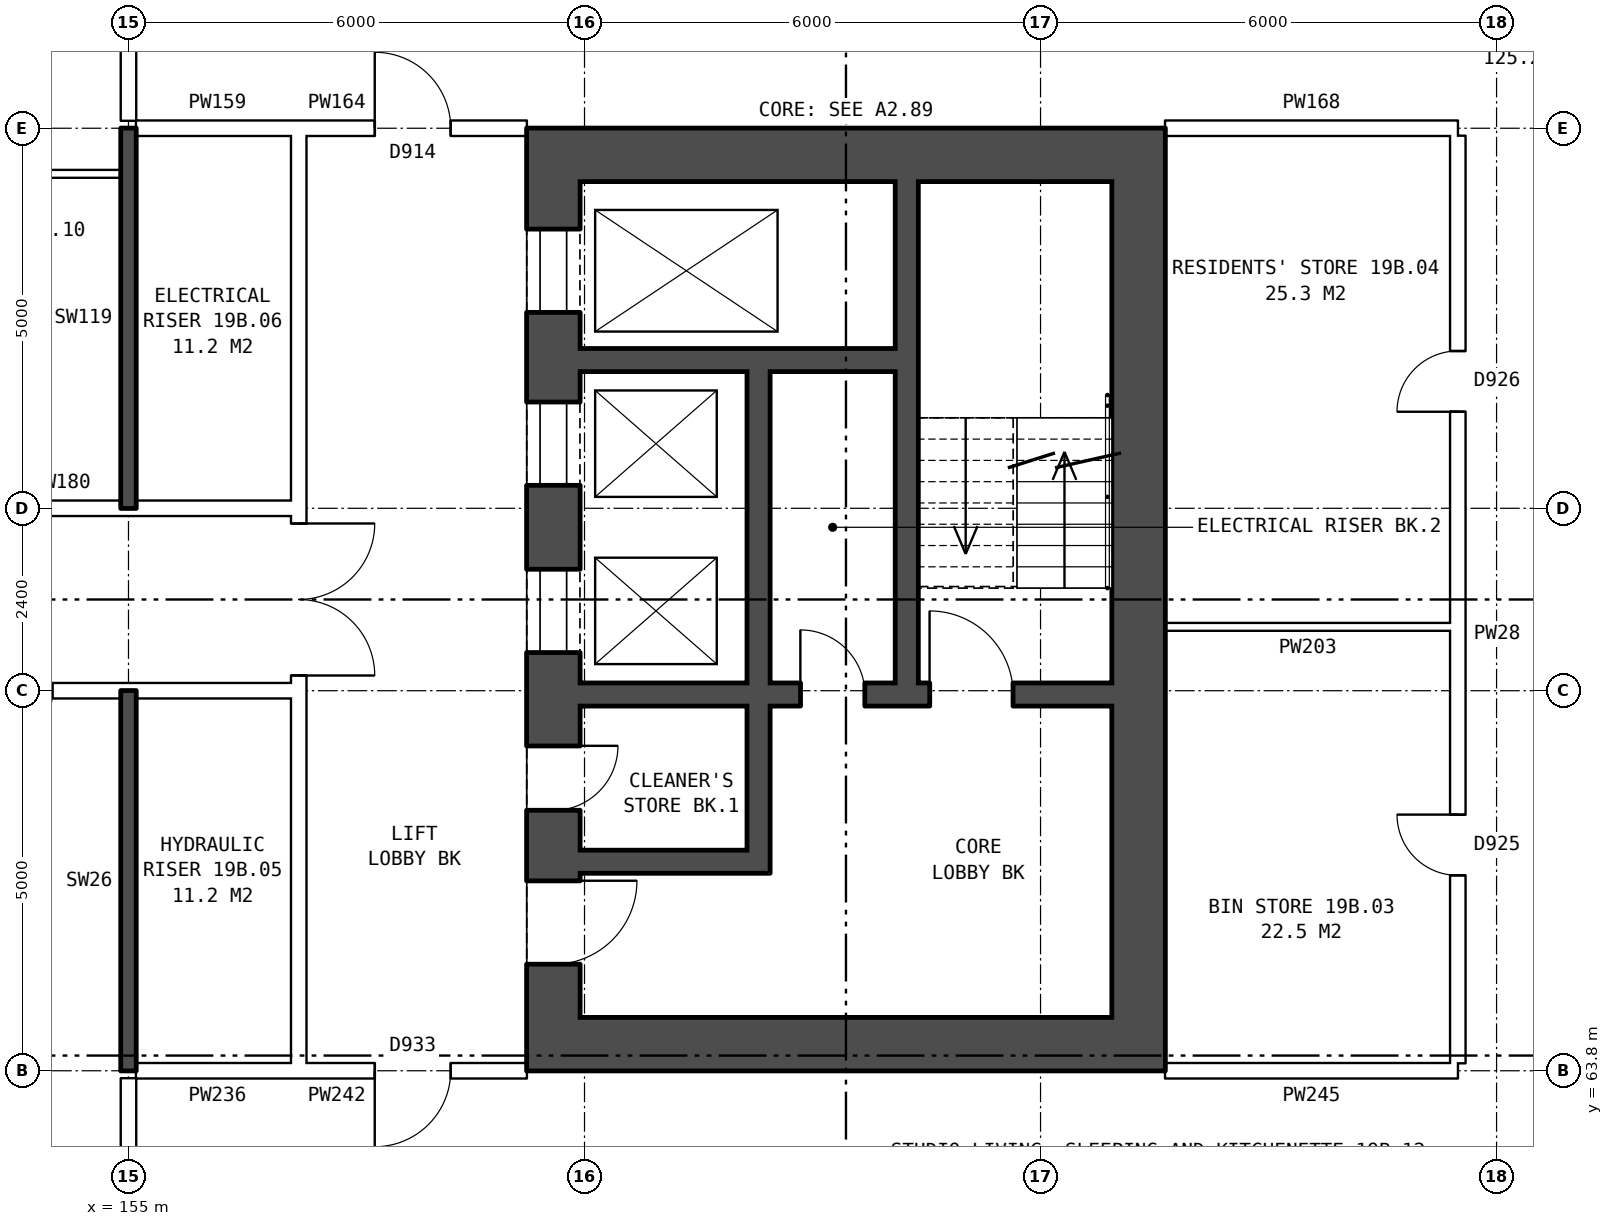
"""IFC4 building model, lengths in metres.
Left out: names, types, materials, properties, quantities, classifications, styles, units other than length and angle.
Written with IfcOpenShell. Run it as: python <this file> out.ifc"""

import sys

from ifc_helpers import new_model, si_unit, direction, frame, frame_2d, origin, place, context, subcontext, project, spatial, rectangle, extrude, element, fill, save


model = new_model("IFC4")
c1 = context("Model", 3, precision=1e-05, world=origin(), true_north=direction((0.0, 1.0)))
c2 = subcontext(c1, "Body", "Model", "MODEL_VIEW")
j1 = project(units=[si_unit("LENGTHUNIT", "METRE"), si_unit("PLANEANGLEUNIT", "RADIAN")], contexts=[c1])
p1 = place(None, origin())
s1 = spatial("IfcSite", under=j1, at=p1, CompositionType="ELEMENT")
p2 = place(p1, origin())
s2 = spatial("IfcBuilding", under=s1, at=p2, CompositionType="ELEMENT")
p3 = place(p2, frame((0.0, 0.0, 71.6)))
s3 = spatial("IfcBuildingStorey", under=s2, at=p3, CompositionType="ELEMENT", Elevation=71.6)
p4 = place(p3, frame((160.59, 75.5, 0.0), z_axis=(0.0, 0.0, 1.0), x_axis=(0.0, -1.0, 0.0)))
e1 = element("IfcWall", 1, at=p4, inside=s3, PredefinedType="SHEAR", context=c2, shape_type="SweptSolid", body=[
    extrude(rectangle(XDim=11.0, YDim=0.7, at=frame_2d((5.5, 0.0))), origin(), (0.0, 0.0, 1.0), 2.85),
])
p5 = place(p4, frame((0.625, 0.0, 0.0)))
e2 = element("IfcOpeningElement", 2, at=p5, cuts=e1, PredefinedType="OPENING", context=c2, shape_type="SweptSolid", body=[
    extrude(rectangle(XDim=1.1, YDim=2.1, at=frame_2d((0.55, 1.05))), frame((0.0, 0.36, 0.0), z_axis=(0.0, -1.0, 0.0), x_axis=(1.0, 0.0, 0.0)), (0.0, 0.0, 1.0), 0.72),
])
p6 = place(p4, frame((2.9, 0.0, 0.0)))
e3 = element("IfcOpeningElement", 3, at=p6, cuts=e1, PredefinedType="OPENING", context=c2, shape_type="SweptSolid", body=[
    extrude(rectangle(XDim=1.1, YDim=2.1, at=frame_2d((0.55, 1.05))), frame((0.0, 0.36, 0.0), z_axis=(0.0, -1.0, 0.0), x_axis=(1.0, 0.0, 0.0)), (0.0, 0.0, 1.0), 0.72),
])
p7 = place(p4, frame((5.1, 0.0, 0.0)))
e4 = element("IfcOpeningElement", 4, at=p7, cuts=e1, PredefinedType="OPENING", context=c2, shape_type="SweptSolid", body=[
    extrude(rectangle(XDim=1.1, YDim=2.1, at=frame_2d((0.55, 1.05))), frame((0.0, 0.36, 0.0), z_axis=(0.0, -1.0, 0.0), x_axis=(1.0, 0.0, 0.0)), (0.0, 0.0, 1.0), 0.72),
])
p8 = place(p4, frame((9.2, 0.0, 0.0)))
e5 = element("IfcOpeningElement", 5, at=p8, cuts=e1, PredefinedType="OPENING", context=c2, shape_type="SweptSolid", body=[
    extrude(rectangle(XDim=1.1, YDim=2.1, at=frame_2d((0.55, 1.05))), frame((0.0, 0.36, 0.0), z_axis=(0.0, -1.0, 0.0), x_axis=(1.0, 0.0, 0.0)), (0.0, 0.0, 1.0), 0.72),
])
p9 = place(p4, frame((7.425, 0.0, 0.0)))
e6 = element("IfcOpeningElement", 6, at=p9, cuts=e1, PredefinedType="OPENING", context=c2, shape_type="SweptSolid", body=[
    extrude(rectangle(XDim=0.85, YDim=2.1, at=frame_2d((0.425, 1.05))), frame((0.0, 0.36, 0.0), z_axis=(0.0, -1.0, 0.0), x_axis=(1.0, 0.0, 0.0)), (0.0, 0.0, 1.0), 0.72),
])
p10 = place(p3, frame((168.29, 75.5, 0.0), z_axis=(0.0, 0.0, 1.0), x_axis=(0.0, -1.0, 0.0)))
e7 = element("IfcWall", 7, at=p10, inside=s3, PredefinedType="SHEAR", context=c2, shape_type="SweptSolid", body=[
    extrude(rectangle(XDim=11.0, YDim=0.7, at=frame_2d((5.5, 0.0))), origin(), (0.0, 0.0, 1.0), 2.85),
])
for number, where, z_axis, x_axis in (
    (8, (160.24, 75.85, 0.0), (0.0, 0.0, 1.0), (1.0, 0.0, 0.0)),
    (9, (160.24, 64.15, 0.0), (0.0, 0.0, 1.0), (1.0, 0.0, 0.0)),
):
    element("IfcWall", number, at=place(p3, frame(where, z_axis=z_axis, x_axis=x_axis)), inside=s3, PredefinedType="SHEAR", context=c2, shape_type="SweptSolid", body=[
        extrude(rectangle(XDim=8.4, YDim=0.7, at=frame_2d((4.2, 0.0))), origin(), (0.0, 0.0, 1.0), 2.85),
    ])
p11 = place(p3, frame((160.94, 73.15, 0.0), z_axis=(0.0, 0.0, 1.0), x_axis=(1.0, 0.0, 0.0)))
e10 = element("IfcWall", 10, at=p11, inside=s3, PredefinedType="SHEAR", context=c2, shape_type="SweptSolid", body=[
    extrude(rectangle(XDim=4.15, YDim=0.3, at=frame_2d((2.075, 0.0))), origin(), (0.0, 0.0, 1.0), 2.85),
])
p12 = place(p3, frame((160.94, 68.75, 0.0), z_axis=(0.0, 0.0, 1.0), x_axis=(1.0, 0.0, 0.0)))
e11 = element("IfcWall", 11, at=p12, inside=s3, PredefinedType="SHEAR", context=c2, shape_type="SweptSolid", body=[
    extrude(rectangle(XDim=7.0, YDim=0.3, at=frame_2d((3.5, 0.0))), origin(), (0.0, 0.0, 1.0), 2.85),
])
p13 = place(p12, frame((4.6, 0.0, 0.0)))
e12 = element("IfcOpeningElement", 12, at=p13, cuts=e11, PredefinedType="OPENING", context=c2, shape_type="SweptSolid", body=[
    extrude(rectangle(XDim=1.1, YDim=2.1, at=frame_2d((0.55, 1.05))), frame((0.0, 0.16, 0.0), z_axis=(0.0, -1.0, 0.0), x_axis=(1.0, 0.0, 0.0)), (0.0, 0.0, 1.0), 0.32),
])
p14 = place(p12, frame((2.9, 0.0, 0.0)))
e13 = element("IfcOpeningElement", 13, at=p14, cuts=e11, PredefinedType="OPENING", context=c2, shape_type="SweptSolid", body=[
    extrude(rectangle(XDim=0.85, YDim=2.1, at=frame_2d((0.425, 1.05))), frame((0.0, 0.16, 0.0), z_axis=(0.0, -1.0, 0.0), x_axis=(1.0, 0.0, 0.0)), (0.0, 0.0, 1.0), 0.32),
])
p15 = place(p3, frame((160.94, 66.55, 0.0), z_axis=(0.0, 0.0, 1.0), x_axis=(1.0, 0.0, 0.0)))
e14 = element("IfcWall", 14, at=p15, inside=s3, PredefinedType="SHEAR", context=c2, shape_type="SweptSolid", body=[
    extrude(rectangle(XDim=2.2, YDim=0.3, at=frame_2d((1.1, 0.0))), origin(), (0.0, 0.0, 1.0), 2.85),
])
p16 = place(p3, frame((163.29, 73.0, 0.0), z_axis=(0.0, 0.0, 1.0), x_axis=(0.0, -1.0, 0.0)))
e15 = element("IfcWall", 15, at=p16, inside=s3, PredefinedType="SHEAR", context=c2, shape_type="SweptSolid", body=[
    extrude(rectangle(XDim=4.1, YDim=0.3, at=frame_2d((2.05, 0.0))), origin(), (0.0, 0.0, 1.0), 2.85),
])
p17 = place(p3, frame((163.29, 68.6, 0.0), z_axis=(0.0, 0.0, 1.0), x_axis=(0.0, -1.0, 0.0)))
e16 = element("IfcWall", 16, at=p17, inside=s3, PredefinedType="SHEAR", context=c2, shape_type="SweptSolid", body=[
    extrude(rectangle(XDim=2.2, YDim=0.3, at=frame_2d((1.1, 0.0))), origin(), (0.0, 0.0, 1.0), 2.85),
])
p18 = place(p3, frame((165.24, 75.5, 0.0), z_axis=(0.0, 0.0, 1.0), x_axis=(0.0, -1.0, 0.0)))
e17 = element("IfcWall", 17, at=p18, inside=s3, PredefinedType="SHEAR", context=c2, shape_type="SweptSolid", body=[
    extrude(rectangle(XDim=6.6, YDim=0.3, at=frame_2d((3.3, 0.0))), origin(), (0.0, 0.0, 1.0), 2.85),
])
p19 = place(p3, frame((157.24, 63.9, 0.0), z_axis=(0.0, 0.0, 1.0), x_axis=(0.0, 1.0, 0.0)))
e18 = element("IfcWall", 18, at=p19, inside=s3, PredefinedType="PARTITIONING", context=c2, shape_type="SweptSolid", body=[
    extrude(rectangle(XDim=12.2, YDim=0.2, at=frame_2d((6.1, 0.0))), origin(), (0.0, 0.0, 1.0), 2.85),
])
p20 = place(p19, frame((5.1, 0.0, 0.0)))
e19 = element("IfcOpeningElement", 19, at=p20, cuts=e18, PredefinedType="OPENING", context=c2, shape_type="SweptSolid", body=[
    extrude(rectangle(XDim=2.0, YDim=2.1, at=frame_2d((1.0, 1.05))), frame((0.0, 0.11, 0.0), z_axis=(0.0, -1.0, 0.0), x_axis=(1.0, 0.0, 0.0)), (0.0, 0.0, 1.0), 0.22),
])
p21 = place(p3, frame((155.1, 63.8, 0.0), z_axis=(0.0, 0.0, 1.0), x_axis=(1.0, 0.0, 0.0)))
e20 = element("IfcWall", 20, at=p21, inside=s3, PredefinedType="PARTITIONING", context=c2, shape_type="SweptSolid", body=[
    extrude(rectangle(XDim=2.14, YDim=0.2, at=frame_2d((1.07, 0.0))), origin(), (0.0, 0.0, 1.0), 2.85),
])
p22 = place(p3, frame((157.24, 63.8, 0.0), z_axis=(0.0, 0.0, 1.0), x_axis=(1.0, 0.0, 0.0)))
e21 = element("IfcWall", 21, at=p22, inside=s3, PredefinedType="PARTITIONING", context=c2, shape_type="SweptSolid", body=[
    extrude(rectangle(XDim=3.0, YDim=0.2, at=frame_2d((1.5, 0.0))), origin(), (0.0, 0.0, 1.0), 2.85),
])
p23 = place(p22, frame((1.0, 0.0, 0.0)))
e22 = element("IfcOpeningElement", 22, at=p23, cuts=e21, PredefinedType="OPENING", context=c2, shape_type="SweptSolid", body=[
    extrude(rectangle(XDim=1.0, YDim=2.1, at=frame_2d((0.5, 1.05))), frame((0.0, 0.11, 0.0), z_axis=(0.0, -1.0, 0.0), x_axis=(1.0, 0.0, 0.0)), (0.0, 0.0, 1.0), 0.22),
])
p24 = place(p3, frame((168.64, 63.8, 0.0), z_axis=(0.0, 0.0, 1.0), x_axis=(1.0, 0.0, 0.0)))
e23 = element("IfcWall", 23, at=p24, inside=s3, PredefinedType="PARTITIONING", context=c2, shape_type="SweptSolid", body=[
    extrude(rectangle(XDim=3.85, YDim=0.2, at=frame_2d((1.925, 0.0))), origin(), (0.0, 0.0, 1.0), 2.85),
])
p25 = place(p3, frame((142.76, 68.8, 0.0), z_axis=(0.0, 0.0, 1.0), x_axis=(1.0, 0.0, 0.0)))
e24 = element("IfcWall", 24, at=p25, inside=s3, PredefinedType="PARTITIONING", context=c2, shape_type="SweptSolid", body=[
    extrude(rectangle(XDim=14.48, YDim=0.2, at=frame_2d((7.24, 0.0))), origin(), (0.0, 0.0, 1.0), 2.85),
])
p26 = place(p25, frame((4.24, 0.0, 0.0)))
e25 = element("IfcOpeningElement", 25, at=p26, cuts=e24, PredefinedType="OPENING", context=c2, shape_type="SweptSolid", body=[
    extrude(rectangle(XDim=1.0, YDim=2.1, at=frame_2d((0.5, 1.05))), frame((0.0, 0.11, 0.0), z_axis=(0.0, -1.0, 0.0), x_axis=(1.0, 0.0, 0.0)), (0.0, 0.0, 1.0), 0.22),
])
p27 = place(p25, frame((10.24, 0.0, 0.0)))
e26 = element("IfcOpeningElement", 26, at=p27, cuts=e24, PredefinedType="OPENING", context=c2, shape_type="SweptSolid", body=[
    extrude(rectangle(XDim=1.0, YDim=2.1, at=frame_2d((0.5, 1.05))), frame((0.0, 0.11, 0.0), z_axis=(0.0, -1.0, 0.0), x_axis=(1.0, 0.0, 0.0)), (0.0, 0.0, 1.0), 0.22),
])
p28 = place(p3, frame((168.64, 69.64, 0.0), z_axis=(0.0, 0.0, 1.0), x_axis=(1.0, 0.0, 0.0)))
e27 = element("IfcWall", 27, at=p28, inside=s3, PredefinedType="PARTITIONING", context=c2, shape_type="SweptSolid", body=[
    extrude(rectangle(XDim=3.75, YDim=0.1, at=frame_2d((1.875, 0.0))), origin(), (0.0, 0.0, 1.0), 2.85),
])
p29 = place(p3, frame((142.76, 71.2, 0.0), z_axis=(0.0, 0.0, 1.0), x_axis=(1.0, 0.0, 0.0)))
e28 = element("IfcWall", 28, at=p29, inside=s3, PredefinedType="PARTITIONING", context=c2, shape_type="SweptSolid", body=[
    extrude(rectangle(XDim=14.48, YDim=0.2, at=frame_2d((7.24, 0.0))), origin(), (0.0, 0.0, 1.0), 2.85),
])
p30 = place(p29, frame((4.24, 0.0, 0.0)))
e29 = element("IfcOpeningElement", 29, at=p30, cuts=e28, PredefinedType="OPENING", context=c2, shape_type="SweptSolid", body=[
    extrude(rectangle(XDim=1.0, YDim=2.1, at=frame_2d((0.5, 1.05))), frame((0.0, 0.11, 0.0), z_axis=(0.0, -1.0, 0.0), x_axis=(1.0, 0.0, 0.0)), (0.0, 0.0, 1.0), 0.22),
])
p31 = place(p29, frame((7.24, 0.0, 0.0)))
e30 = element("IfcOpeningElement", 30, at=p31, cuts=e28, PredefinedType="OPENING", context=c2, shape_type="SweptSolid", body=[
    extrude(rectangle(XDim=1.0, YDim=2.1, at=frame_2d((0.5, 1.05))), frame((0.0, 0.11, 0.0), z_axis=(0.0, -1.0, 0.0), x_axis=(1.0, 0.0, 0.0)), (0.0, 0.0, 1.0), 0.22),
])
p32 = place(p3, frame((152.0, 75.6, 0.0), z_axis=(0.0, 0.0, 1.0), x_axis=(1.0, 0.0, 0.0)))
e31 = element("IfcWall", 31, at=p32, inside=s3, PredefinedType="PARTITIONING", context=c2, shape_type="SweptSolid", body=[
    extrude(rectangle(XDim=2.9, YDim=0.1, at=frame_2d((1.45, 0.0))), origin(), (0.0, 0.0, 1.0), 2.85),
])
p33 = place(p3, frame((155.1, 76.2, 0.0), z_axis=(0.0, 0.0, 1.0), x_axis=(1.0, 0.0, 0.0)))
e32 = element("IfcWall", 32, at=p33, inside=s3, PredefinedType="PARTITIONING", context=c2, shape_type="SweptSolid", body=[
    extrude(rectangle(XDim=2.14, YDim=0.2, at=frame_2d((1.07, 0.0))), origin(), (0.0, 0.0, 1.0), 2.85),
])
p34 = place(p3, frame((157.24, 76.2, 0.0), z_axis=(0.0, 0.0, 1.0), x_axis=(1.0, 0.0, 0.0)))
e33 = element("IfcWall", 33, at=p34, inside=s3, PredefinedType="PARTITIONING", context=c2, shape_type="SweptSolid", body=[
    extrude(rectangle(XDim=3.0, YDim=0.2, at=frame_2d((1.5, 0.0))), origin(), (0.0, 0.0, 1.0), 2.85),
])
p35 = place(p34, frame((1.0, 0.0, 0.0)))
e34 = element("IfcOpeningElement", 34, at=p35, cuts=e33, PredefinedType="OPENING", context=c2, shape_type="SweptSolid", body=[
    extrude(rectangle(XDim=1.0, YDim=2.1, at=frame_2d((0.5, 1.05))), frame((0.0, 0.11, 0.0), z_axis=(0.0, -1.0, 0.0), x_axis=(1.0, 0.0, 0.0)), (0.0, 0.0, 1.0), 0.22),
])
p36 = place(p3, frame((168.64, 76.2, 0.0), z_axis=(0.0, 0.0, 1.0), x_axis=(1.0, 0.0, 0.0)))
e35 = element("IfcWall", 35, at=p36, inside=s3, PredefinedType="PARTITIONING", context=c2, shape_type="SweptSolid", body=[
    extrude(rectangle(XDim=3.85, YDim=0.2, at=frame_2d((1.925, 0.0))), origin(), (0.0, 0.0, 1.0), 2.85),
])
p37 = place(p3, frame((155.0, 61.5, 0.0), z_axis=(0.0, 0.0, 1.0), x_axis=(0.0, 1.0, 0.0)))
e36 = element("IfcWall", 36, at=p37, inside=s3, PredefinedType="PARTITIONING", context=c2, shape_type="SweptSolid", body=[
    extrude(rectangle(XDim=2.2, YDim=0.2, at=frame_2d((1.1, 0.0))), origin(), (0.0, 0.0, 1.0), 2.85),
])
for number, where, z_axis, x_axis in (
    (37, (155.0, 63.8, 0.0), (0.0, 0.0, 1.0), (0.0, 1.0, 0.0)),
    (38, (155.0, 71.2, 0.0), (0.0, 0.0, 1.0), (0.0, 1.0, 0.0)),
):
    element("IfcWall", number, at=place(p3, frame(where, z_axis=z_axis, x_axis=x_axis)), inside=s3, PredefinedType="SOLIDWALL", context=c2, shape_type="SweptSolid", body=[
        extrude(rectangle(XDim=5.0, YDim=0.2, at=frame_2d((2.5, 0.0))), origin(), (0.0, 0.0, 1.0), 2.85),
    ])
p38 = place(p3, frame((155.0, 76.3, 0.0), z_axis=(0.0, 0.0, 1.0), x_axis=(0.0, 1.0, 0.0)))
e39 = element("IfcWall", 39, at=p38, inside=s3, PredefinedType="PARTITIONING", context=c2, shape_type="SweptSolid", body=[
    extrude(rectangle(XDim=2.2, YDim=0.2, at=frame_2d((1.1, 0.0))), origin(), (0.0, 0.0, 1.0), 2.85),
])
p39 = place(p3, frame((172.49, 63.9, 0.0), z_axis=(0.0, 0.0, 1.0), x_axis=(0.0, 1.0, 0.0)))
e40 = element("IfcWall", 40, at=p39, inside=s3, PredefinedType="PARTITIONING", context=c2, shape_type="SweptSolid", body=[
    extrude(rectangle(XDim=12.2, YDim=0.2, at=frame_2d((6.1, 0.0))), origin(), (0.0, 0.0, 1.0), 2.85),
])
p40 = place(p39, frame((2.47, 0.0, 0.0)))
e41 = element("IfcOpeningElement", 41, at=p40, cuts=e40, PredefinedType="OPENING", context=c2, shape_type="SweptSolid", body=[
    extrude(rectangle(XDim=0.8, YDim=2.1, at=frame_2d((0.4, 1.05))), frame((0.0, 0.11, 0.0), z_axis=(0.0, -1.0, 0.0), x_axis=(1.0, 0.0, 0.0)), (0.0, 0.0, 1.0), 0.22),
])
p41 = place(p39, frame((8.57, 0.0, 0.0)))
e42 = element("IfcOpeningElement", 42, at=p41, cuts=e40, PredefinedType="OPENING", context=c2, shape_type="SweptSolid", body=[
    extrude(rectangle(XDim=0.8, YDim=2.1, at=frame_2d((0.4, 1.05))), frame((0.0, 0.11, 0.0), z_axis=(0.0, -1.0, 0.0), x_axis=(1.0, 0.0, 0.0)), (0.0, 0.0, 1.0), 0.22),
])
p42 = place(p5, origin())
e43 = element("IfcDoor", 43, at=p42, inside=s3, OperationType="DOUBLE_DOOR_SLIDING", PredefinedType="DOOR", context=c2, shape_type="SweptSolid", body=[
    extrude(rectangle(XDim=1.1, YDim=2.1, at=frame_2d((0.55, 1.05))), frame((0.0, 0.335, 0.0), z_axis=(0.0, -1.0, 0.0), x_axis=(1.0, 0.0, 0.0)), (0.0, 0.0, 1.0), 0.05),
])
fill(e2, e43)
p43 = place(p6, origin())
e44 = element("IfcDoor", 44, at=p43, inside=s3, OperationType="DOUBLE_DOOR_SLIDING", PredefinedType="DOOR", context=c2, shape_type="SweptSolid", body=[
    extrude(rectangle(XDim=1.1, YDim=2.1, at=frame_2d((0.55, 1.05))), frame((0.0, 0.335, 0.0), z_axis=(0.0, -1.0, 0.0), x_axis=(1.0, 0.0, 0.0)), (0.0, 0.0, 1.0), 0.05),
])
fill(e3, e44)
p44 = place(p7, origin())
e45 = element("IfcDoor", 45, at=p44, inside=s3, OperationType="DOUBLE_DOOR_SLIDING", PredefinedType="DOOR", context=c2, shape_type="SweptSolid", body=[
    extrude(rectangle(XDim=1.1, YDim=2.1, at=frame_2d((0.55, 1.05))), frame((0.0, 0.335, 0.0), z_axis=(0.0, -1.0, 0.0), x_axis=(1.0, 0.0, 0.0)), (0.0, 0.0, 1.0), 0.05),
])
fill(e4, e45)
p45 = place(p8, origin())
e46 = element("IfcDoor", 46, at=p45, inside=s3, OperationType="SINGLE_SWING_LEFT", PredefinedType="DOOR", context=c2, shape_type="SweptSolid", body=[
    extrude(rectangle(XDim=1.1, YDim=2.1, at=frame_2d((0.55, 1.05))), frame((0.0, 0.335, 0.0), z_axis=(0.0, -1.0, 0.0), x_axis=(1.0, 0.0, 0.0)), (0.0, 0.0, 1.0), 0.05),
])
fill(e5, e46)
p46 = place(p13, origin())
e47 = element("IfcDoor", 47, at=p46, inside=s3, OperationType="SINGLE_SWING_LEFT", PredefinedType="DOOR", context=c2, shape_type="SweptSolid", body=[
    extrude(rectangle(XDim=1.1, YDim=2.1, at=frame_2d((0.55, 1.05))), frame((0.0, 0.025, 0.0), z_axis=(0.0, -1.0, 0.0), x_axis=(1.0, 0.0, 0.0)), (0.0, 0.0, 1.0), 0.05),
])
fill(e12, e47)
p47 = place(p9, origin())
e48 = element("IfcDoor", 48, at=p47, inside=s3, OperationType="SINGLE_SWING_LEFT", PredefinedType="DOOR", context=c2, shape_type="SweptSolid", body=[
    extrude(rectangle(XDim=0.85, YDim=2.1, at=frame_2d((0.425, 1.05))), frame((0.0, 0.335, 0.0), z_axis=(0.0, -1.0, 0.0), x_axis=(1.0, 0.0, 0.0)), (0.0, 0.0, 1.0), 0.05),
])
fill(e6, e48)
p48 = place(p14, origin())
e49 = element("IfcDoor", 49, at=p48, inside=s3, OperationType="SINGLE_SWING_LEFT", PredefinedType="DOOR", context=c2, shape_type="SweptSolid", body=[
    extrude(rectangle(XDim=0.85, YDim=2.1, at=frame_2d((0.425, 1.05))), frame((0.0, 0.025, 0.0), z_axis=(0.0, -1.0, 0.0), x_axis=(1.0, 0.0, 0.0)), (0.0, 0.0, 1.0), 0.05),
])
fill(e13, e49)
p49 = place(p20, frame((2.0, 0.0, 0.0), z_axis=(0.0, 0.0, 1.0), x_axis=(-1.0, 0.0, 0.0)))
e50 = element("IfcDoor", 50, at=p49, inside=s3, OperationType="DOUBLE_DOOR_SINGLE_SWING", PredefinedType="DOOR", context=c2, shape_type="SweptSolid", body=[
    extrude(rectangle(XDim=2.0, YDim=2.1, at=frame_2d((1.0, 1.05))), frame((0.0, 0.025, 0.0), z_axis=(0.0, -1.0, 0.0), x_axis=(1.0, 0.0, 0.0)), (0.0, 0.0, 1.0), 0.05),
])
fill(e19, e50)
p50 = place(p23, frame((1.0, 0.0, 0.0), z_axis=(0.0, 0.0, 1.0), x_axis=(-1.0, 0.0, 0.0)))
e51 = element("IfcDoor", 51, at=p50, inside=s3, OperationType="SINGLE_SWING_RIGHT", PredefinedType="DOOR", context=c2, shape_type="SweptSolid", body=[
    extrude(rectangle(XDim=1.0, YDim=2.1, at=frame_2d((0.5, 1.05))), frame((0.0, 0.025, 0.0), z_axis=(0.0, -1.0, 0.0), x_axis=(1.0, 0.0, 0.0)), (0.0, 0.0, 1.0), 0.05),
])
fill(e22, e51)
p51 = place(p35, origin())
e52 = element("IfcDoor", 52, at=p51, inside=s3, OperationType="SINGLE_SWING_LEFT", PredefinedType="DOOR", context=c2, shape_type="SweptSolid", body=[
    extrude(rectangle(XDim=1.0, YDim=2.1, at=frame_2d((0.5, 1.05))), frame((0.0, 0.025, 0.0), z_axis=(0.0, -1.0, 0.0), x_axis=(1.0, 0.0, 0.0)), (0.0, 0.0, 1.0), 0.05),
])
fill(e34, e52)
p52 = place(p40, origin())
e53 = element("IfcDoor", 53, at=p52, inside=s3, OperationType="SINGLE_SWING_RIGHT", PredefinedType="DOOR", context=c2, shape_type="SweptSolid", body=[
    extrude(rectangle(XDim=0.8, YDim=2.1, at=frame_2d((0.4, 1.05))), frame((0.0, 0.025, 0.0), z_axis=(0.0, -1.0, 0.0), x_axis=(1.0, 0.0, 0.0)), (0.0, 0.0, 1.0), 0.05),
])
fill(e41, e53)
p53 = place(p41, origin())
e54 = element("IfcDoor", 54, at=p53, inside=s3, OperationType="SINGLE_SWING_LEFT", PredefinedType="DOOR", context=c2, shape_type="SweptSolid", body=[
    extrude(rectangle(XDim=0.8, YDim=2.1, at=frame_2d((0.4, 1.05))), frame((0.0, 0.025, 0.0), z_axis=(0.0, -1.0, 0.0), x_axis=(1.0, 0.0, 0.0)), (0.0, 0.0, 1.0), 0.05),
])
fill(e42, e54)
save(model, sys.argv[1])
